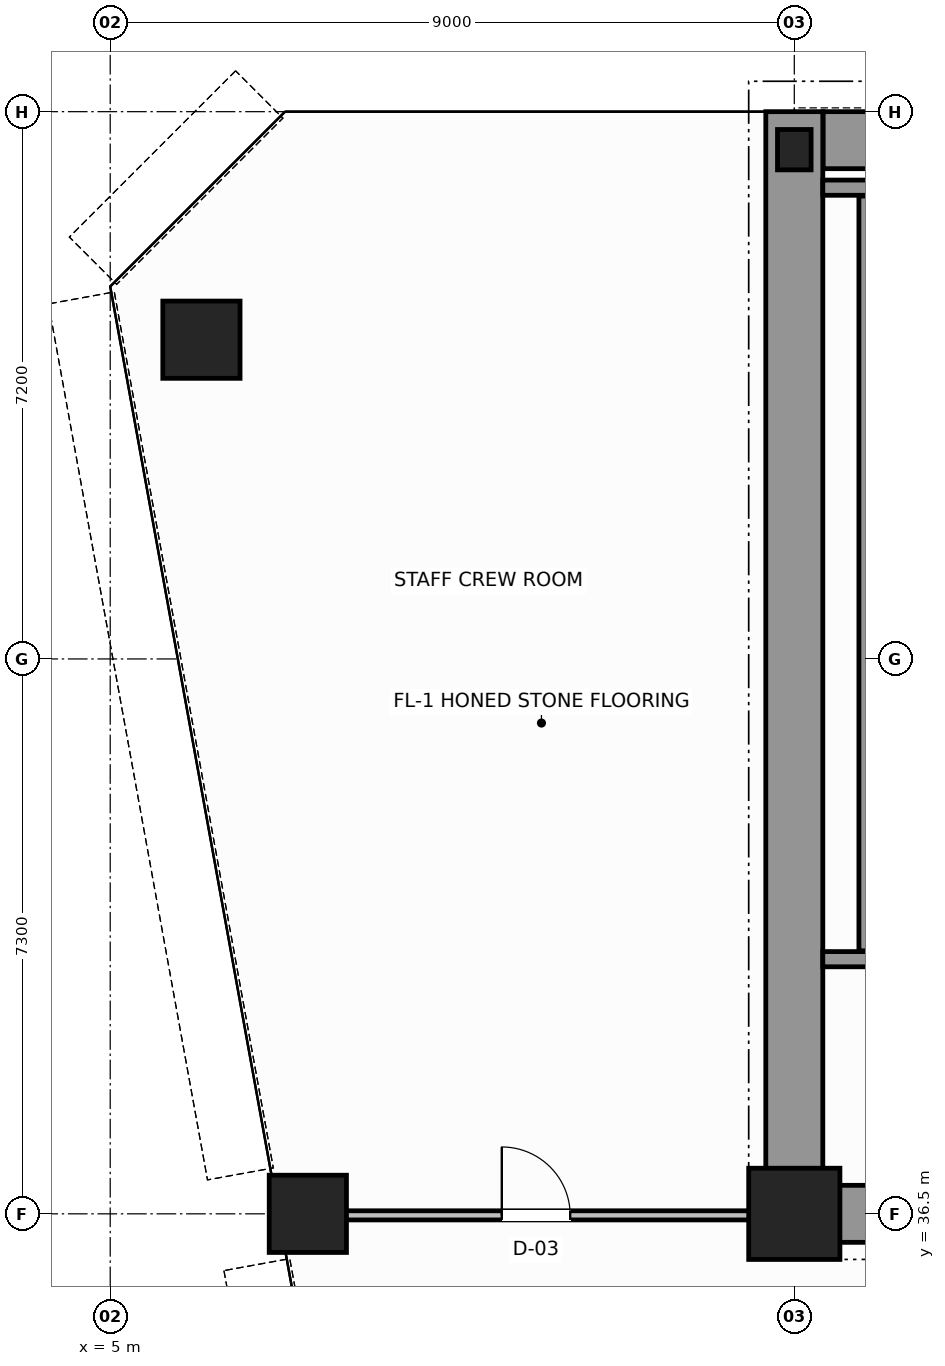
"""IFC4 building model, lengths in metres.
Left out: names, types, materials, properties, quantities, classifications, styles, units other than length and angle.
Written with IfcOpenShell. Run it as: python <this file> out.ifc"""

import sys

from ifc_helpers import new_model, si_unit, direction, frame, frame_2d, origin, origin_2d, place, context, subcontext, project, spatial, rectangle, hollow_circle, i_section, extrude, source, transform, mapped, element, fill, save


model = new_model("IFC4")
c1 = context("Model", 3, precision=1e-05, world=origin(), true_north=direction((0.0, 1.0)))
c2 = subcontext(c1, "Body", "Model", "MODEL_VIEW")
j1 = project(units=[si_unit("LENGTHUNIT", "METRE"), si_unit("PLANEANGLEUNIT", "RADIAN")], contexts=[c1])
p1 = place(None, origin())
s1 = spatial("IfcSite", under=j1, at=p1, CompositionType="ELEMENT")
p2 = place(p1, origin())
s2 = spatial("IfcBuilding", under=s1, at=p2, CompositionType="ELEMENT")
p3 = place(p2, frame((0.0, 0.0, 137.6)))
s3 = spatial("IfcBuildingStorey", under=s2, at=p3, CompositionType="ELEMENT", Elevation=137.6)
m1 = source(origin(), c2, "Body", "SweptSolid", [
    extrude(rectangle(XDim=1.2, YDim=1.2, at=origin_2d()), origin(), (0.0, 0.0, 1.0), 3.8),
])
p4 = place(p3, frame((14.0, 36.5, 0.0), z_axis=(0.0, 0.0, 1.0), x_axis=(1.0, 0.0, 0.0)))
e1 = element("IfcColumn", 1, at=p4, inside=s3, PredefinedType="COLUMN", context=c2, shape_type="MappedRepresentation", body=[
    mapped(m1, transform((0.0, 0.0, 0.0), scale=1.0)),
])
m2 = source(origin(), c2, "Body", "SweptSolid", [
    extrude(i_section(OverallWidth=0.442, OverallDepth=0.531, WebThickness=0.065, FlangeThickness=0.076, FilletRadius=0.015, at=origin_2d()), origin(), (0.0, 0.0, 1.0), 3.8),
])
p5 = place(p3, frame((14.0, 50.5, 0.0), z_axis=(0.0, 0.0, 1.0), x_axis=(1.0, 0.0, 0.0)))
e2 = element("IfcColumn", 2, at=p5, inside=s3, PredefinedType="COLUMN", context=c2, shape_type="MappedRepresentation", body=[
    mapped(m2, transform((0.0, 0.0, 0.0), scale=1.0)),
])
m3 = source(origin(), c2, "Body", "SweptSolid", [
    extrude(hollow_circle(Radius=0.508, WallThickness=0.045, at=origin_2d()), origin(), (0.0, 0.0, 1.0), 3.8),
])
for number, where, z_axis, x_axis in (
    (3, (6.2, 48.0, 0.0), (0.0, 0.0, 1.0), (1.0, 0.0, 0.0)),
    (4, (7.6, 36.5, 0.0), (0.0, 0.0, 1.0), (1.0, 0.0, 0.0)),
):
    element("IfcColumn", number, at=place(p3, frame(where, z_axis=z_axis, x_axis=x_axis)), inside=s3, PredefinedType="COLUMN", context=c2, shape_type="MappedRepresentation", body=[
        mapped(m3, transform((0.0, 0.0, 0.0), scale=1.0)),
    ])
p6 = place(p3, frame((14.379, 50.625, 0.0), z_axis=(0.0, 0.0, 1.0), x_axis=(1.0, 0.0, 0.0)))
e5 = element("IfcWall", 5, at=p6, inside=s3, PredefinedType="SHEAR", context=c2, shape_type="SweptSolid", body=[
    extrude(rectangle(XDim=19.619, YDim=0.75, at=frame_2d((9.81, 0.0))), origin(), (0.0, 0.0, 1.0), 3.8),
])
p7 = place(p3, frame((14.0, 36.5, 0.0), z_axis=(0.0, 0.0, 1.0), x_axis=(0.0, 1.0, 0.0)))
e6 = element("IfcWall", 6, at=p7, inside=s3, PredefinedType="SHEAR", context=c2, shape_type="SweptSolid", body=[
    extrude(rectangle(XDim=14.5, YDim=0.75, at=frame_2d((7.25, 0.0))), origin(), (0.0, 0.0, 1.0), 3.8),
])
p8 = place(p3, frame((14.395, 36.5, 0.0), z_axis=(0.0, 0.0, 1.0), x_axis=(1.0, 0.0, 0.0)))
e7 = element("IfcWall", 7, at=p8, inside=s3, PredefinedType="SHEAR", context=c2, shape_type="SweptSolid", body=[
    extrude(rectangle(XDim=3.805, YDim=0.75, at=frame_2d((1.902, 0.0))), origin(), (0.0, 0.0, 1.0), 2.38),
])
p9 = place(p3, frame((14.375, 39.85, 0.0), z_axis=(0.0, 0.0, 1.0), x_axis=(1.0, 0.0, 0.0)))
e8 = element("IfcWall", 8, at=p9, inside=s3, PredefinedType="SOLIDWALL", context=c2, shape_type="SweptSolid", body=[
    extrude(rectangle(XDim=4.225, YDim=0.2, at=frame_2d((2.113, 0.0))), origin(), (0.0, 0.0, 1.0), 3.8),
])
p10 = place(p9, frame((1.8, 0.0, 0.0)))
e9 = element("IfcOpeningElement", 9, at=p10, cuts=e8, PredefinedType="OPENING", context=c2, shape_type="SweptSolid", body=[
    extrude(rectangle(XDim=1.1, YDim=2.15, at=frame_2d((0.55, 1.075))), frame((0.0, 0.11, 0.0), z_axis=(0.0, -1.0, 0.0), x_axis=(1.0, 0.0, 0.0)), (0.0, 0.0, 1.0), 0.22),
])
p11 = place(p3, frame((14.375, 50.0, 0.0), z_axis=(0.0, 0.0, 1.0), x_axis=(1.0, 0.0, 0.0)))
e10 = element("IfcWall", 10, at=p11, inside=s3, PredefinedType="SOLIDWALL", context=c2, shape_type="SweptSolid", body=[
    extrude(rectangle(XDim=4.225, YDim=0.2, at=frame_2d((2.113, 0.0))), origin(), (0.0, 0.0, 1.0), 3.8),
])
p12 = place(p3, frame((14.95, 39.96, 0.0), z_axis=(0.0, 0.0, 1.0), x_axis=(0.0, 1.0, 0.0)))
e11 = element("IfcWall", 11, at=p12, inside=s3, PredefinedType="SOLIDWALL", context=c2, shape_type="SweptSolid", body=[
    extrude(rectangle(XDim=9.93, YDim=0.2, at=frame_2d((4.965, 0.0))), origin(), (0.0, 0.0, 1.0), 3.8),
])
p13 = place(p3, frame((7.264, 36.48, 0.0), z_axis=(0.0, 0.0, 1.0), x_axis=(1.0, 0.0, 0.0)))
e12 = element("IfcWall", 12, at=p13, inside=s3, PredefinedType="PARTITIONING", context=c2, shape_type="SweptSolid", body=[
    extrude(rectangle(XDim=6.676, YDim=0.12, at=frame_2d((3.338, 0.0))), origin(), (0.0, 0.0, 1.0), 2.87),
])
p14 = place(p13, frame((2.888, 0.0, 0.0)))
e13 = element("IfcOpeningElement", 13, at=p14, cuts=e12, PredefinedType="OPENING", context=c2, shape_type="SweptSolid", body=[
    extrude(rectangle(XDim=0.9, YDim=2.15, at=frame_2d((0.45, 1.075))), frame((0.0, 0.07, 0.0), z_axis=(0.0, -1.0, 0.0), x_axis=(1.0, 0.0, 0.0)), (0.0, 0.0, 1.0), 0.14),
])
m4 = source(origin(), c2, "Body", "SweptSolid", [
    extrude(rectangle(XDim=0.9, YDim=2.15, at=frame_2d((0.45, 1.075))), frame((0.0, 0.025, 0.0), z_axis=(0.0, -1.0, 0.0), x_axis=(1.0, 0.0, 0.0)), (0.0, 0.0, 1.0), 0.05),
])
p15 = place(p14, origin())
e14 = element("IfcDoor", 14, at=p15, inside=s3, OperationType="SINGLE_SWING_LEFT", PredefinedType="DOOR", context=c2, shape_type="MappedRepresentation", body=[
    mapped(m4, transform((0.0, 0.0, 0.0), scale=1.0)),
])
fill(e13, e14)
save(model, sys.argv[1])
